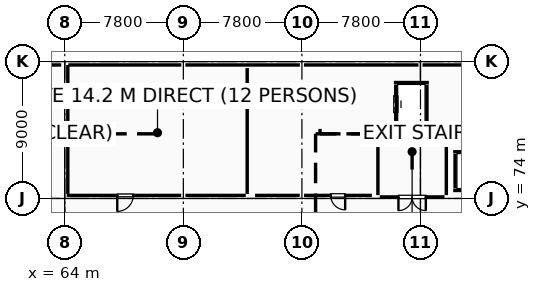
"""IFC4 building model, lengths in metres.
Left out: names, types, materials, properties, quantities, classifications, styles, units other than length and angle.
Written with IfcOpenShell. Run it as: python <this file> out.ifc"""

import sys

from ifc_helpers import new_model, si_unit, direction, frame, frame_2d, origin, origin_2d, place, context, subcontext, project, spatial, rectangle, hollow_rectangle, i_section, extrude, element, fill, save


model = new_model("IFC4")
c1 = context("Model", 3, precision=1e-05, world=origin(), true_north=direction((0.0, 1.0)))
c2 = subcontext(c1, "Body", "Model", "MODEL_VIEW")
j1 = project(units=[si_unit("LENGTHUNIT", "METRE"), si_unit("PLANEANGLEUNIT", "RADIAN")], contexts=[c1])
p1 = place(None, origin())
s1 = spatial("IfcSite", under=j1, at=p1, CompositionType="ELEMENT")
p2 = place(p1, origin())
s2 = spatial("IfcBuilding", under=s1, at=p2, CompositionType="ELEMENT")
p3 = place(p2, frame((0.0, 0.0, 24.3)))
s3 = spatial("IfcBuildingStorey", under=s2, at=p3, CompositionType="ELEMENT", Elevation=24.3)
p4 = place(p3, frame((64.0, 74.0, 0.0), z_axis=(0.0, 0.0, 1.0), x_axis=(1.0, 0.0, 0.0)))
e1 = element("IfcColumn", 1, at=p4, inside=s3, PredefinedType="COLUMN", context=c2, shape_type="SweptSolid", body=[
    extrude(i_section(OverallWidth=0.25, OverallDepth=0.45, WebThickness=0.011, FlangeThickness=0.014, FilletRadius=0.015, at=origin_2d()), origin(), (0.0, 0.0, 1.0), 4.5),
])
p5 = place(p3, frame((64.0, 83.0, 0.0), z_axis=(0.0, 0.0, 1.0), x_axis=(1.0, 0.0, 0.0)))
e2 = element("IfcColumn", 2, at=p5, inside=s3, PredefinedType="COLUMN", context=c2, shape_type="SweptSolid", body=[
    extrude(hollow_rectangle(XDim=0.45, YDim=0.45, WallThickness=0.02, at=origin_2d()), origin(), (0.0, 0.0, 1.0), 4.5),
])
for number, where, z_axis, x_axis in (
    (3, (71.8, 74.0, 0.0), (0.0, 0.0, 1.0), (1.0, 0.0, 0.0)),
    (4, (71.8, 83.0, 0.0), (0.0, 0.0, 1.0), (1.0, 0.0, 0.0)),
    (5, (79.6, 74.0, 0.0), (0.0, 0.0, 1.0), (1.0, 0.0, 0.0)),
    (6, (79.6, 83.0, 0.0), (0.0, 0.0, 1.0), (1.0, 0.0, 0.0)),
    (7, (87.4, 83.0, 0.0), (0.0, 0.0, 1.0), (1.0, 0.0, 0.0)),
):
    element("IfcColumn", number, at=place(p3, frame(where, z_axis=z_axis, x_axis=x_axis)), inside=s3, PredefinedType="COLUMN", context=c2, shape_type="SweptSolid", body=[
        extrude(i_section(OverallWidth=0.25, OverallDepth=0.45, WebThickness=0.011, FlangeThickness=0.014, FilletRadius=0.015, at=origin_2d()), origin(), (0.0, 0.0, 1.0), 4.5),
    ])
p6 = place(p3, frame((62.804, 82.78, 0.0), z_axis=(0.0, 0.0, 1.0), x_axis=(1.0, 0.0, 0.0)))
e8 = element("IfcWall", 8, at=p6, inside=s3, PredefinedType="STANDARD", context=c2, shape_type="SweptSolid", body=[
    extrude(rectangle(XDim=0.963, YDim=0.4, at=frame_2d((0.481, 0.0))), origin(), (0.0, 0.0, 1.0), 4.28),
])
p7 = place(p3, frame((64.233, 82.78, 0.0), z_axis=(0.0, 0.0, 1.0), x_axis=(1.0, 0.0, 0.0)))
e9 = element("IfcWall", 9, at=p7, inside=s3, PredefinedType="STANDARD", context=c2, shape_type="SweptSolid", body=[
    extrude(rectangle(XDim=7.434, YDim=0.4, at=frame_2d((3.717, 0.0))), origin(), (0.0, 0.0, 1.0), 4.5),
])
p8 = place(p3, frame((71.933, 82.78, 0.0), z_axis=(0.0, 0.0, 1.0), x_axis=(1.0, 0.0, 0.0)))
e10 = element("IfcWall", 10, at=p8, inside=s3, PredefinedType="STANDARD", context=c2, shape_type="SweptSolid", body=[
    extrude(rectangle(XDim=7.534, YDim=0.4, at=frame_2d((3.767, 0.0))), origin(), (0.0, 0.0, 1.0), 4.5),
])
p9 = place(p3, frame((79.733, 82.78, 0.0), z_axis=(0.0, 0.0, 1.0), x_axis=(1.0, 0.0, 0.0)))
e11 = element("IfcWall", 11, at=p9, inside=s3, PredefinedType="STANDARD", context=c2, shape_type="SweptSolid", body=[
    extrude(rectangle(XDim=7.534, YDim=0.4, at=frame_2d((3.767, 0.0))), origin(), (0.0, 0.0, 1.0), 4.5),
])
p10 = place(p3, frame((87.533, 82.78, 0.0), z_axis=(0.0, 0.0, 1.0), x_axis=(1.0, 0.0, 0.0)))
e12 = element("IfcWall", 12, at=p10, inside=s3, PredefinedType="STANDARD", context=c2, shape_type="SweptSolid", body=[
    extrude(rectangle(XDim=5.863, YDim=0.4, at=frame_2d((2.932, 0.0))), origin(), (0.0, 0.0, 1.0), 4.28),
])
p11 = place(p3, frame((89.55, 74.525, 0.0), z_axis=(0.0, 0.0, 1.0), x_axis=(1.0, 0.0, 0.0)))
e13 = element("IfcWall", 13, at=p11, inside=s3, PredefinedType="STANDARD", context=c2, shape_type="SweptSolid", body=[
    extrude(rectangle(XDim=2.5, YDim=0.25, at=frame_2d((1.25, 0.0))), origin(), (0.0, 0.0, 1.0), 4.27),
])
p12 = place(p11, frame((0.65, 0.0, 0.0)))
e14 = element("IfcOpeningElement", 14, at=p12, cuts=e13, PredefinedType="OPENING", context=c2, shape_type="SweptSolid", body=[
    extrude(rectangle(XDim=1.2, YDim=2.05, at=frame_2d((0.6, 1.025))), frame((0.0, 0.135, 0.0), z_axis=(0.0, -1.0, 0.0), x_axis=(1.0, 0.0, 0.0)), (0.0, 0.0, 1.0), 0.27),
])
p13 = place(p3, frame((92.05, 77.075, 0.0), z_axis=(0.0, 0.0, 1.0), x_axis=(-1.0, 0.0, 0.0)))
e15 = element("IfcWall", 15, at=p13, inside=s3, PredefinedType="STANDARD", context=c2, shape_type="SweptSolid", body=[
    extrude(rectangle(XDim=2.5, YDim=0.25, at=frame_2d((1.25, 0.0))), origin(), (0.0, 0.0, 1.0), 4.27),
])
p14 = place(p3, frame((89.675, 76.94, 0.0), z_axis=(0.0, 0.0, 1.0), x_axis=(0.0, -1.0, 0.0)))
e16 = element("IfcWall", 16, at=p14, inside=s3, PredefinedType="STANDARD", context=c2, shape_type="SweptSolid", body=[
    extrude(rectangle(XDim=2.28, YDim=0.25, at=frame_2d((1.14, 0.0))), origin(), (0.0, 0.0, 1.0), 4.27),
])
for number, where, z_axis, x_axis in (
    (17, (85.65, 78.775, 0.0), (0.0, 0.0, 1.0), (1.0, 0.0, 0.0)),
    (18, (87.95, 81.625, 0.0), (0.0, 0.0, 1.0), (-1.0, 0.0, 0.0)),
):
    element("IfcWall", number, at=place(p3, frame(where, z_axis=z_axis, x_axis=x_axis)), inside=s3, PredefinedType="STANDARD", context=c2, shape_type="SweptSolid", body=[
        extrude(rectangle(XDim=2.3, YDim=0.25, at=frame_2d((1.15, 0.0))), origin(), (0.0, 0.0, 1.0), 4.5),
    ])
p15 = place(p3, frame((87.825, 78.91, 0.0), z_axis=(0.0, 0.0, 1.0), x_axis=(0.0, 1.0, 0.0)))
e19 = element("IfcWall", 19, at=p15, inside=s3, PredefinedType="STANDARD", context=c2, shape_type="SweptSolid", body=[
    extrude(rectangle(XDim=2.58, YDim=0.25, at=frame_2d((1.29, 0.0))), origin(), (0.0, 0.0, 1.0), 4.5),
])
p16 = place(p3, frame((85.775, 81.49, 0.0), z_axis=(0.0, 0.0, 1.0), x_axis=(0.0, -1.0, 0.0)))
e20 = element("IfcWall", 20, at=p16, inside=s3, PredefinedType="STANDARD", context=c2, shape_type="SweptSolid", body=[
    extrude(rectangle(XDim=2.58, YDim=0.25, at=frame_2d((1.29, 0.0))), origin(), (0.0, 0.0, 1.0), 4.5),
])
p17 = place(p16, frame((0.74, 0.0, 0.0)))
e21 = element("IfcOpeningElement", 21, at=p17, cuts=e20, PredefinedType="OPENING", context=c2, shape_type="SweptSolid", body=[
    extrude(rectangle(XDim=1.1, YDim=2.15, at=frame_2d((0.55, 1.075))), frame((0.0, 0.135, 0.0), z_axis=(0.0, -1.0, 0.0), x_axis=(1.0, 0.0, 0.0)), (0.0, 0.0, 1.0), 0.27),
])
p18 = place(p3, frame((84.6, 74.22, 0.0), z_axis=(0.0, 0.0, 1.0), x_axis=(0.0, 1.0, 0.0)))
e22 = element("IfcWall", 22, at=p18, inside=s3, PredefinedType="PARTITIONING", context=c2, shape_type="SweptSolid", body=[
    extrude(rectangle(XDim=3.36, YDim=0.2, at=frame_2d((1.68, 0.0))), origin(), (0.0, 0.0, 1.0), 4.5),
])
p19 = place(p3, frame((84.72, 77.7, 0.0), z_axis=(0.0, 0.0, 1.0), x_axis=(1.0, 0.0, 0.0)))
e23 = element("IfcWall", 23, at=p19, inside=s3, PredefinedType="PARTITIONING", context=c2, shape_type="SweptSolid", body=[
    extrude(rectangle(XDim=4.26, YDim=0.2, at=frame_2d((2.13, 0.0))), origin(), (0.0, 0.0, 1.0), 4.5),
])
p20 = place(p3, frame((89.1, 77.58, 0.0), z_axis=(0.0, 0.0, 1.0), x_axis=(0.0, -1.0, 0.0)))
e24 = element("IfcWall", 24, at=p20, inside=s3, PredefinedType="PARTITIONING", context=c2, shape_type="SweptSolid", body=[
    extrude(rectangle(XDim=3.36, YDim=0.2, at=frame_2d((1.68, 0.0))), origin(), (0.0, 0.0, 1.0), 4.5),
])
p21 = place(p3, frame((88.98, 74.1, 0.0), z_axis=(0.0, 0.0, 1.0), x_axis=(-1.0, 0.0, 0.0)))
e25 = element("IfcWall", 25, at=p21, inside=s3, PredefinedType="PARTITIONING", context=c2, shape_type="SweptSolid", body=[
    extrude(rectangle(XDim=4.26, YDim=0.2, at=frame_2d((2.13, 0.0))), origin(), (0.0, 0.0, 1.0), 4.5),
])
p22 = place(p21, frame((1.23, 0.0, 0.0)))
e26 = element("IfcOpeningElement", 26, at=p22, cuts=e25, PredefinedType="OPENING", context=c2, shape_type="SweptSolid", body=[
    extrude(rectangle(XDim=1.8, YDim=2.15, at=frame_2d((0.9, 1.075))), frame((0.0, 0.11, 0.0), z_axis=(0.0, -1.0, 0.0), x_axis=(1.0, 0.0, 0.0)), (0.0, 0.0, 1.0), 0.22),
])
p23 = place(p3, frame((76.0, 82.576, 0.0), z_axis=(0.0, 0.0, 1.0), x_axis=(0.0, -1.0, 0.0)))
e27 = element("IfcWall", 27, at=p23, inside=s3, PredefinedType="PARTITIONING", context=c2, shape_type="SweptSolid", body=[
    extrude(rectangle(XDim=8.281, YDim=0.15, at=frame_2d((4.141, 0.0))), origin(), (0.0, 0.0, 1.0), 4.5),
])
p24 = place(p3, frame((75.905, 74.2, 0.0), z_axis=(0.0, 0.0, 1.0), x_axis=(-1.0, 0.0, 0.0)))
e28 = element("IfcWall", 28, at=p24, inside=s3, PredefinedType="PARTITIONING", context=c2, shape_type="SweptSolid", body=[
    extrude(rectangle(XDim=3.965, YDim=0.15, at=frame_2d((1.982, 0.0))), origin(), (0.0, 0.0, 1.0), 4.5),
])
p25 = place(p3, frame((71.66, 74.2, 0.0), z_axis=(0.0, 0.0, 1.0), x_axis=(-1.0, 0.0, 0.0)))
e29 = element("IfcWall", 29, at=p25, inside=s3, PredefinedType="PARTITIONING", context=c2, shape_type="SweptSolid", body=[
    extrude(rectangle(XDim=7.531, YDim=0.15, at=frame_2d((3.766, 0.0))), origin(), (0.0, 0.0, 1.0), 4.27),
])
p26 = place(p25, frame((3.157, 0.0, 0.0)))
e30 = element("IfcOpeningElement", 30, at=p26, cuts=e29, PredefinedType="OPENING", context=c2, shape_type="SweptSolid", body=[
    extrude(rectangle(XDim=1.05, YDim=2.15, at=frame_2d((0.525, 1.075))), frame((0.0, 0.085, 0.0), z_axis=(0.0, -1.0, 0.0), x_axis=(1.0, 0.0, 0.0)), (0.0, 0.0, 1.0), 0.17),
])
p27 = place(p3, frame((64.2, 74.295, 0.0), z_axis=(0.0, 0.0, 1.0), x_axis=(0.0, 1.0, 0.0)))
e31 = element("IfcWall", 31, at=p27, inside=s3, PredefinedType="PARTITIONING", context=c2, shape_type="SweptSolid", body=[
    extrude(rectangle(XDim=8.476, YDim=0.15, at=frame_2d((4.238, 0.0))), origin(), (0.0, 0.0, 1.0), 3.71),
])
p28 = place(p3, frame((84.2, 74.2, 0.0), z_axis=(0.0, 0.0, 1.0), x_axis=(-1.0, 0.0, 0.0)))
e32 = element("IfcWall", 32, at=p28, inside=s3, PredefinedType="PARTITIONING", context=c2, shape_type="SweptSolid", body=[
    extrude(rectangle(XDim=4.46, YDim=0.2, at=frame_2d((2.23, 0.0))), origin(), (0.0, 0.0, 1.0), 4.5),
])
p29 = place(p28, frame((1.755, 0.0, 0.0)))
e33 = element("IfcOpeningElement", 33, at=p29, cuts=e32, PredefinedType="OPENING", context=c2, shape_type="SweptSolid", body=[
    extrude(rectangle(XDim=0.95, YDim=2.15, at=frame_2d((0.475, 1.075))), frame((0.0, 0.11, 0.0), z_axis=(0.0, -1.0, 0.0), x_axis=(1.0, 0.0, 0.0)), (0.0, 0.0, 1.0), 0.22),
])
p30 = place(p3, frame((79.46, 74.2, 0.0), z_axis=(0.0, 0.0, 1.0), x_axis=(-1.0, 0.0, 0.0)))
e34 = element("IfcWall", 34, at=p30, inside=s3, PredefinedType="PARTITIONING", context=c2, shape_type="SweptSolid", body=[
    extrude(rectangle(XDim=2.94, YDim=0.2, at=frame_2d((1.47, 0.0))), origin(), (0.0, 0.0, 1.0), 4.5),
])
p31 = place(p17, origin())
e35 = element("IfcDoor", 35, at=p31, inside=s3, OperationType="DOUBLE_DOOR_SLIDING", PredefinedType="DOOR", context=c2, shape_type="SweptSolid", body=[
    extrude(rectangle(XDim=1.1, YDim=2.15, at=frame_2d((0.55, 1.075))), frame((0.0, 0.025, 0.0), z_axis=(0.0, -1.0, 0.0), x_axis=(1.0, 0.0, 0.0)), (0.0, 0.0, 1.0), 0.05),
])
fill(e21, e35)
p32 = place(p22, origin())
e36 = element("IfcDoor", 36, at=p32, inside=s3, OperationType="DOUBLE_DOOR_SINGLE_SWING", PredefinedType="DOOR", context=c2, shape_type="SweptSolid", body=[
    extrude(rectangle(XDim=1.8, YDim=2.15, at=frame_2d((0.9, 1.075))), frame((0.0, 0.025, 0.0), z_axis=(0.0, -1.0, 0.0), x_axis=(1.0, 0.0, 0.0)), (0.0, 0.0, 1.0), 0.05),
])
fill(e26, e36)
p33 = place(p26, origin())
e37 = element("IfcDoor", 37, at=p33, inside=s3, OperationType="SINGLE_SWING_RIGHT", PredefinedType="DOOR", context=c2, shape_type="SweptSolid", body=[
    extrude(rectangle(XDim=1.05, YDim=2.15, at=frame_2d((0.525, 1.075))), frame((0.0, 0.025, 0.0), z_axis=(0.0, -1.0, 0.0), x_axis=(1.0, 0.0, 0.0)), (0.0, 0.0, 1.0), 0.05),
])
fill(e30, e37)
p34 = place(p29, origin())
e38 = element("IfcDoor", 38, at=p34, inside=s3, OperationType="SINGLE_SWING_LEFT", PredefinedType="DOOR", context=c2, shape_type="SweptSolid", body=[
    extrude(rectangle(XDim=0.95, YDim=2.15, at=frame_2d((0.475, 1.075))), frame((0.0, 0.025, 0.0), z_axis=(0.0, -1.0, 0.0), x_axis=(1.0, 0.0, 0.0)), (0.0, 0.0, 1.0), 0.05),
])
fill(e33, e38)
save(model, sys.argv[1])
